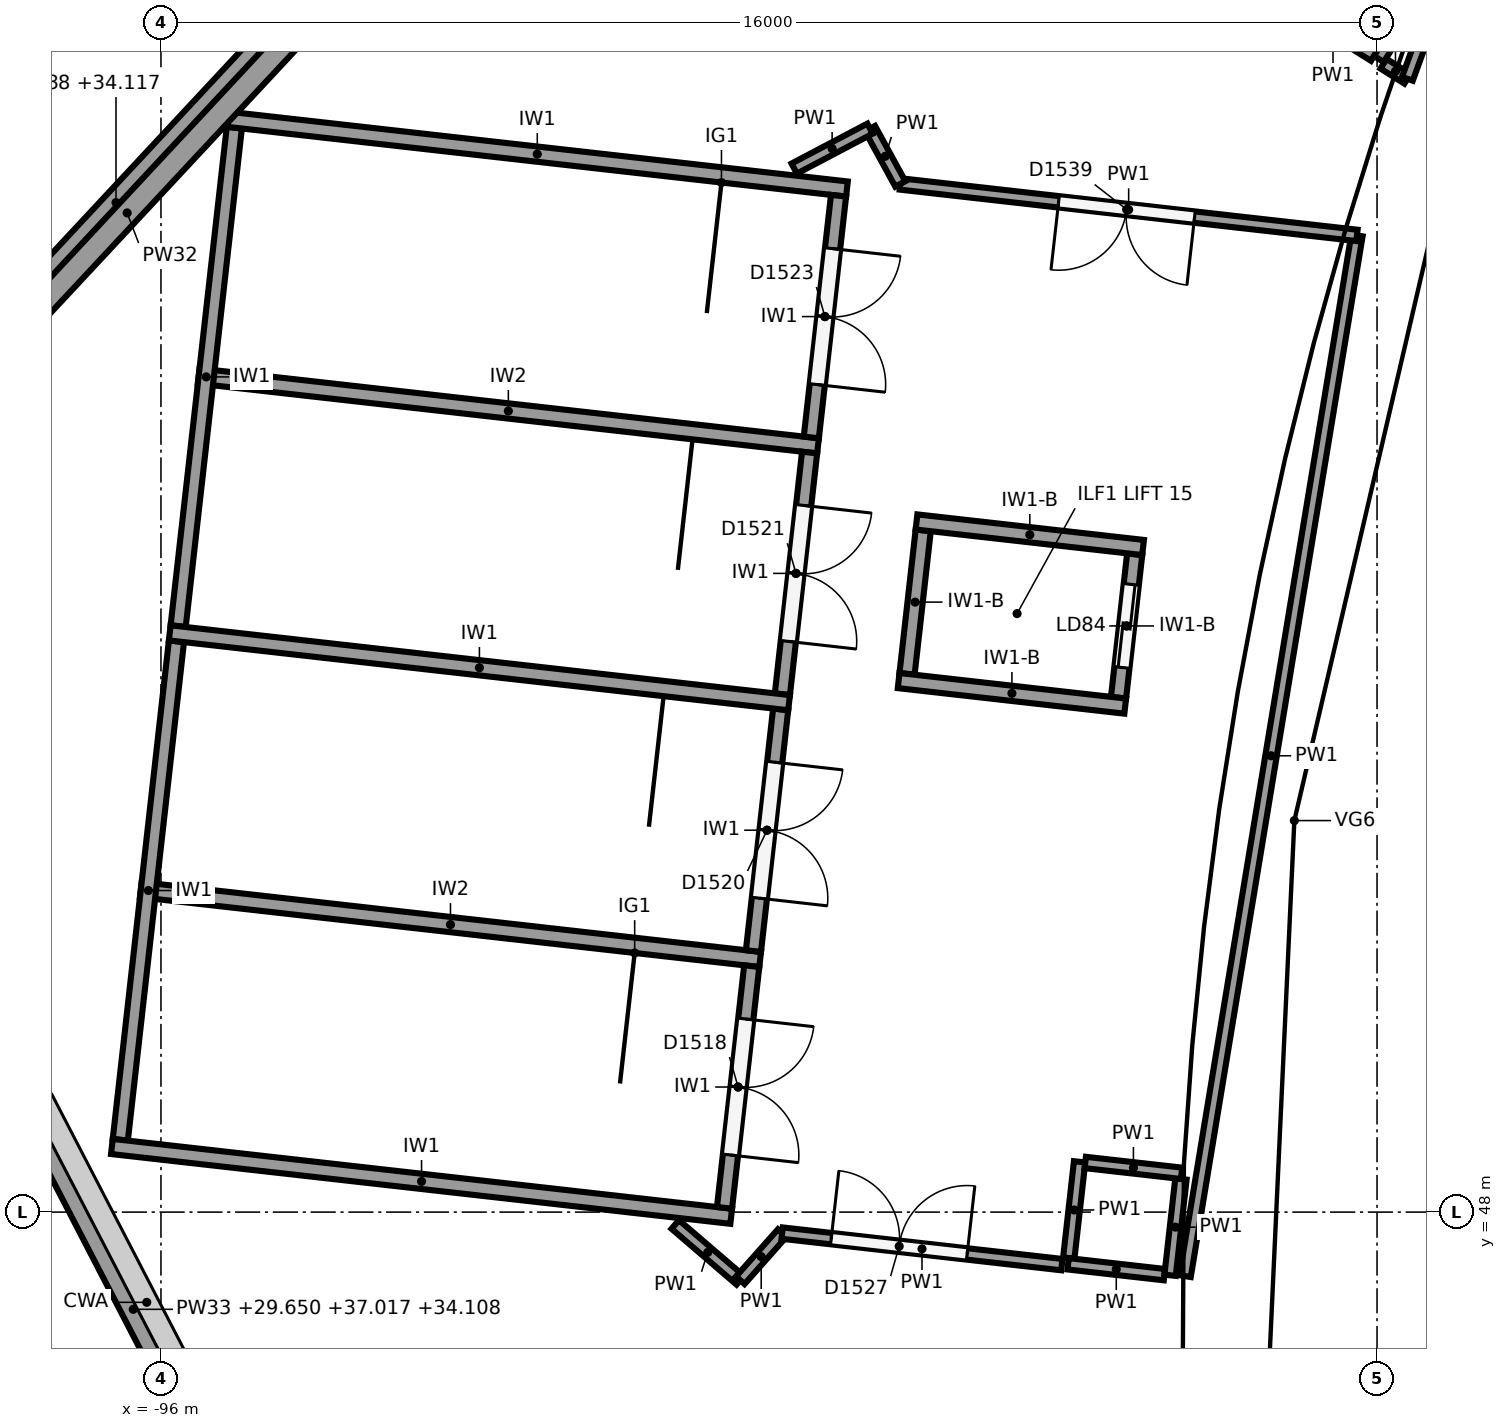
"""IFC4 building model, lengths in metres.
Left out: names, types, materials, properties, quantities, classifications, styles, units other than length and angle.
Written with IfcOpenShell. Run it as: python <this file> out.ifc"""

import sys

from ifc_helpers import new_model, si_unit, direction, frame, frame_2d, origin, origin_2d, place, context, subcontext, project, spatial, polyline, rectangle, circle, outline, extrude, element, fill, save


model = new_model("IFC4")
c1 = context("Model", 3, precision=1e-05, world=origin(), true_north=direction((0.0, 1.0)))
c2 = subcontext(c1, "Body", "Model", "MODEL_VIEW")
j1 = project(units=[si_unit("LENGTHUNIT", "METRE"), si_unit("PLANEANGLEUNIT", "RADIAN")], contexts=[c1])
p1 = place(None, origin())
s1 = spatial("IfcSite", under=j1, at=p1, CompositionType="ELEMENT")
p2 = place(p1, origin())
s2 = spatial("IfcBuilding", under=s1, at=p2, CompositionType="ELEMENT")
p3 = place(p2, frame((0.0, 0.0, 24.0)))
s3 = spatial("IfcBuildingStorey", under=s2, at=p3, CompositionType="ELEMENT", Elevation=24.0)
p4 = place(p3, frame((-82.169, 63.034, 0.0), z_axis=(0.0, 0.0, 1.0), x_axis=(1.0, 0.0, 0.0)))
e1 = element("IfcColumn", 1, at=p4, inside=s3, PredefinedType="COLUMN", context=c2, shape_type="SweptSolid", body=[
    extrude(circle(Radius=0.5, at=origin_2d()), origin(), (0.0, 0.0, 1.0), 6.0),
])
p5 = place(p3, frame((-84.363, 53.565, 0.0), z_axis=(0.0, 0.0, 1.0), x_axis=(1.0, 0.0, 0.0)))
e2 = element("IfcColumn", 2, at=p5, inside=s3, PredefinedType="COLUMN", context=c2, shape_type="SweptSolid", body=[
    extrude(circle(Radius=0.6, at=origin_2d()), origin(), (0.0, 0.0, 1.0), 6.0),
])
p6 = place(p3, frame((-100.711, 56.568, 0.0), z_axis=(0.0, 0.0, 1.0), x_axis=(0.681794658463, 0.731543603411, 0.0)))
e3 = element("IfcWall", 3, at=p6, inside=s3, PredefinedType="SOLIDWALL", context=c2, shape_type="SweptSolid", body=[
    extrude(rectangle(XDim=12.514, YDim=0.32, at=frame_2d((6.257, 0.0))), origin(), (0.0, 0.0, 1.0), 6.0),
])
p7 = place(p6, frame((10.864, 0.0, 1.0)))
e4 = element("IfcOpeningElement", 4, at=p7, cuts=e3, PredefinedType="OPENING", context=c2, shape_type="SweptSolid", body=[
    extrude(rectangle(XDim=0.9, YDim=3.25, at=frame_2d((0.45, 1.625))), frame((0.0, 0.17, 0.0), z_axis=(0.0, -1.0, 0.0), x_axis=(1.0, 0.0, 0.0)), (0.0, 0.0, 1.0), 0.34),
])
p8 = place(p6, frame((0.364, 0.0, 1.0)))
e5 = element("IfcOpeningElement", 5, at=p8, cuts=e3, PredefinedType="OPENING", context=c2, shape_type="SweptSolid", body=[
    extrude(rectangle(XDim=0.9, YDim=3.25, at=frame_2d((0.45, 1.625))), frame((0.0, 0.17, 0.0), z_axis=(0.0, -1.0, 0.0), x_axis=(1.0, 0.0, 0.0)), (0.0, 0.0, 1.0), 0.34),
])
p9 = place(p3, frame((-100.857, 56.705, 6.0), z_axis=(0.0, 0.0, 1.0), x_axis=(0.681794658463, 0.731543603411, 0.0)))
e6 = element("IfcWall", 6, at=p9, inside=s3, PredefinedType="SOLIDWALL", context=c2, shape_type="SweptSolid", body=[
    extrude(outline(polyline([(0.0, 0.0), (12.514, 0.0), (12.514, 4.117), (0.0, 10.438), (0.0, 0.0)])), frame((0.0, 0.16, 0.0), z_axis=(0.0, -1.0, 0.0), x_axis=(1.0, 0.0, 0.0)), (0.0, 0.0, 1.0), 0.32),
])
p10 = place(p9, frame((0.364, 0.0, 1.6)))
e7 = element("IfcOpeningElement", 7, at=p10, cuts=e6, PredefinedType="OPENING", context=c2, shape_type="SweptSolid", body=[
    extrude(rectangle(XDim=0.9, YDim=3.0, at=frame_2d((0.45, 1.5))), frame((0.0, 0.17, 0.0), z_axis=(0.0, -1.0, 0.0), x_axis=(1.0, 0.0, 0.0)), (0.0, 0.0, 1.0), 0.34),
])
p11 = place(p3, frame((-94.984, 44.057, 5.65), z_axis=(0.0, 0.0, 1.0), x_axis=(-0.460041593728, 0.887897365713, 0.0)))
e8 = element("IfcWall", 8, at=p11, inside=s3, PredefinedType="SOLIDWALL", context=c2, shape_type="SweptSolid", body=[
    extrude(outline(polyline([(0.0, 0.0), (6.0, 0.0), (6.0, 7.367), (0.0, 4.458), (0.0, 0.0)])), frame((0.0, 0.16, 0.0), z_axis=(0.0, -1.0, 0.0), x_axis=(1.0, 0.0, 0.0)), (0.0, 0.0, 1.0), 0.32),
])
p12 = place(p3, frame((-95.123, 62.378, 0.0), z_axis=(0.0, 0.0, 1.0), x_axis=(0.993710792168, -0.111977058046, 0.0)))
e9 = element("IfcWall", 9, at=p12, inside=s3, PredefinedType="SHEAR", context=c2, shape_type="SweptSolid", body=[
    extrude(rectangle(XDim=8.2, YDim=0.2, at=frame_2d((4.1, 0.0))), origin(), (0.0, 0.0, 1.0), 5.75),
])
p13 = place(p3, frame((-95.885, 55.621, 0.0), z_axis=(0.0, 0.0, 1.0), x_axis=(0.993711165474, -0.111973745194, 0.0)))
e10 = element("IfcWall", 10, at=p13, inside=s3, PredefinedType="SHEAR", context=c2, shape_type="SweptSolid", body=[
    extrude(rectangle(XDim=8.2, YDim=0.2, at=frame_2d((4.1, 0.0))), origin(), (0.0, 0.0, 1.0), 5.75),
])
p14 = place(p3, frame((-96.646, 48.863, 0.0), z_axis=(0.0, 0.0, 1.0), x_axis=(0.993714104693, -0.111947658007, 0.0)))
e11 = element("IfcWall", 11, at=p14, inside=s3, PredefinedType="SHEAR", context=c2, shape_type="SweptSolid", body=[
    extrude(rectangle(XDim=8.2, YDim=0.2, at=frame_2d((4.1, 0.0))), origin(), (0.0, 0.0, 1.0), 5.75),
])
for number, where, z_axis, x_axis in (
    (12, (-95.035, 62.267, 0.0), (0.0, 0.0, 1.0), (-0.112, -0.994, 0.0)),
    (13, (-95.796, 55.51, 0.0), (0.0, 0.0, 1.0), (-0.112, -0.994, 0.0)),
):
    element("IfcWall", number, at=place(p3, frame(where, z_axis=z_axis, x_axis=x_axis)), inside=s3, PredefinedType="SHEAR", context=c2, shape_type="SweptSolid", body=[
        extrude(rectangle(XDim=6.6, YDim=0.2, at=frame_2d((3.3, 0.0))), origin(), (0.0, 0.0, 1.0), 5.75),
    ])
p15 = place(p3, frame((-95.504, 58.999, 0.0), z_axis=(0.0, 0.0, 1.0), x_axis=(0.993710792168, -0.111977058046, 0.0)))
e14 = element("IfcWall", 14, at=p15, inside=s3, PredefinedType="SHEAR", context=c2, shape_type="SweptSolid", body=[
    extrude(rectangle(XDim=8.2, YDim=0.2, at=frame_2d((4.1, 0.0))), origin(), (0.0, 0.0, 1.0), 5.75),
])
p16 = place(p3, frame((-96.265, 52.242, 0.0), z_axis=(0.0, 0.0, 1.0), x_axis=(0.993713731549, -0.111950970206, 0.0)))
e15 = element("IfcWall", 15, at=p16, inside=s3, PredefinedType="SHEAR", context=c2, shape_type="SweptSolid", body=[
    extrude(rectangle(XDim=8.2, YDim=0.2, at=frame_2d((4.1, 0.0))), origin(), (0.0, 0.0, 1.0), 5.75),
])
p17 = place(p3, frame((-87.085, 61.372, 0.0), z_axis=(0.0, 0.0, 1.0), x_axis=(-0.11192190762, -0.993717005286, 0.0)))
e16 = element("IfcWall", 16, at=p17, inside=s3, PredefinedType="SHEAR", context=c2, shape_type="SweptSolid", body=[
    extrude(rectangle(XDim=3.2, YDim=0.2, at=frame_2d((1.6, 0.0))), origin(), (0.0, 0.0, 1.0), 5.75),
])
p18 = place(p17, frame((0.7, 0.0, 0.0)))
e17 = element("IfcOpeningElement", 17, at=p18, cuts=e16, PredefinedType="OPENING", context=c2, shape_type="SweptSolid", body=[
    extrude(rectangle(XDim=1.8, YDim=2.1, at=frame_2d((0.9, 1.05))), frame((0.0, 0.11, 0.0), z_axis=(0.0, -1.0, 0.0), x_axis=(1.0, 0.0, 0.0)), (0.0, 0.0, 1.0), 0.22),
])
p19 = place(p3, frame((-87.466, 57.993, 0.0), z_axis=(0.0, 0.0, 1.0), x_axis=(-0.111997244021, -0.993708517288, 0.0)))
e18 = element("IfcWall", 18, at=p19, inside=s3, PredefinedType="SHEAR", context=c2, shape_type="SweptSolid", body=[
    extrude(rectangle(XDim=3.2, YDim=0.2, at=frame_2d((1.6, 0.0))), origin(), (0.0, 0.0, 1.0), 5.75),
])
p20 = place(p19, frame((0.7, 0.0, 0.0)))
e19 = element("IfcOpeningElement", 19, at=p20, cuts=e18, PredefinedType="OPENING", context=c2, shape_type="SweptSolid", body=[
    extrude(rectangle(XDim=1.8, YDim=2.1, at=frame_2d((0.9, 1.05))), frame((0.0, 0.11, 0.0), z_axis=(0.0, -1.0, 0.0), x_axis=(1.0, 0.0, 0.0)), (0.0, 0.0, 1.0), 0.22),
])
p21 = place(p3, frame((-87.846, 54.614, 0.0), z_axis=(0.0, 0.0, 1.0), x_axis=(-0.112005735442, -0.993707560215, 0.0)))
e20 = element("IfcWall", 20, at=p21, inside=s3, PredefinedType="SHEAR", context=c2, shape_type="SweptSolid", body=[
    extrude(rectangle(XDim=3.2, YDim=0.2, at=frame_2d((1.6, 0.0))), origin(), (0.0, 0.0, 1.0), 5.75),
])
p22 = place(p21, frame((0.7, 0.0, 0.0)))
e21 = element("IfcOpeningElement", 21, at=p22, cuts=e20, PredefinedType="OPENING", context=c2, shape_type="SweptSolid", body=[
    extrude(rectangle(XDim=1.8, YDim=2.1, at=frame_2d((0.9, 1.05))), frame((0.0, 0.11, 0.0), z_axis=(0.0, -1.0, 0.0), x_axis=(1.0, 0.0, 0.0)), (0.0, 0.0, 1.0), 0.22),
])
p23 = place(p3, frame((-88.227, 51.236, 0.0), z_axis=(0.0, 0.0, 1.0), x_axis=(-0.111930393474, -0.993716049491, 0.0)))
e22 = element("IfcWall", 22, at=p23, inside=s3, PredefinedType="SHEAR", context=c2, shape_type="SweptSolid", body=[
    extrude(rectangle(XDim=3.2, YDim=0.2, at=frame_2d((1.6, 0.0))), origin(), (0.0, 0.0, 1.0), 5.75),
])
p24 = place(p23, frame((0.7, 0.0, 0.0)))
e23 = element("IfcOpeningElement", 23, at=p24, cuts=e22, PredefinedType="OPENING", context=c2, shape_type="SweptSolid", body=[
    extrude(rectangle(XDim=1.8, YDim=2.1, at=frame_2d((0.9, 1.05))), frame((0.0, 0.11, 0.0), z_axis=(0.0, -1.0, 0.0), x_axis=(1.0, 0.0, 0.0)), (0.0, 0.0, 1.0), 0.22),
])
for number, where, z_axis, x_axis in (
    (24, (-86.059, 57.08, 0.0), (0.0, 0.0, 1.0), (0.994, -0.112, 0.0)),
    (25, (-86.294, 54.993, 0.0), (0.0, 0.0, 1.0), (0.994, -0.112, 0.0)),
):
    element("IfcWall", number, at=place(p3, frame(where, z_axis=z_axis, x_axis=x_axis)), inside=s3, PredefinedType="SHEAR", context=c2, shape_type="SweptSolid", body=[
        extrude(rectangle(XDim=3.0, YDim=0.2, at=frame_2d((1.5, 0.0))), origin(), (0.0, 0.0, 1.0), 4.6),
    ])
p25 = place(p3, frame((-85.971, 56.969, 0.0), z_axis=(0.0, 0.0, 1.0), x_axis=(-0.112039012324, -0.993703808847, 0.0)))
e26 = element("IfcWall", 26, at=p25, inside=s3, PredefinedType="SHEAR", context=c2, shape_type="SweptSolid", body=[
    extrude(rectangle(XDim=1.9, YDim=0.2, at=frame_2d((0.95, 0.0))), origin(), (0.0, 0.0, 1.0), 4.6),
])
p26 = place(p3, frame((-83.189, 56.656, 0.0), z_axis=(0.0, 0.0, 1.0), x_axis=(-0.11191213732, -0.993718105662, 0.0)))
e27 = element("IfcWall", 27, at=p26, inside=s3, PredefinedType="SHEAR", context=c2, shape_type="SweptSolid", body=[
    extrude(rectangle(XDim=1.9, YDim=0.2, at=frame_2d((0.95, 0.0))), origin(), (0.0, 0.0, 1.0), 4.6),
])
p27 = place(p26, frame((0.4, 0.0, 0.0)))
e28 = element("IfcOpeningElement", 28, at=p27, cuts=e27, PredefinedType="OPENING", context=c2, shape_type="SweptSolid", body=[
    extrude(rectangle(XDim=1.1, YDim=2.1, at=frame_2d((0.55, 1.05))), frame((0.0, 0.11, 0.0), z_axis=(0.0, -1.0, 0.0), x_axis=(1.0, 0.0, 0.0)), (0.0, 0.0, 1.0), 0.22),
])
p28 = place(p3, frame((-81.119, 63.888, 0.0), z_axis=(0.0, 0.0, 1.0), x_axis=(0.846683377265, -0.532097038765, 0.0)))
e29 = element("IfcWall", 29, at=p28, inside=s3, PredefinedType="PARTITIONING", context=c2, shape_type="SweptSolid", body=[
    extrude(rectangle(XDim=1.275, YDim=0.15, at=frame_2d((0.638, 0.0))), origin(), (0.0, 0.0, 1.0), 5.4),
])
p29 = place(p3, frame((-79.976, 63.17, 0.0), z_axis=(0.0, 0.0, 1.0), x_axis=(0.531959757672, 0.846769635862, 0.0)))
e30 = element("IfcWall", 30, at=p29, inside=s3, PredefinedType="PARTITIONING", context=c2, shape_type="SweptSolid", body=[
    extrude(rectangle(XDim=1.275, YDim=0.15, at=frame_2d((0.637, 0.0))), origin(), (0.0, 0.0, 1.0), 5.4),
])
p30 = place(p3, frame((-79.915, 63.108, 0.0), z_axis=(0.0, 0.0, 1.0), x_axis=(0.846738245251, -0.532009721744, 0.0)))
e31 = element("IfcWall", 31, at=p30, inside=s3, PredefinedType="PARTITIONING", context=c2, shape_type="SweptSolid", body=[
    extrude(rectangle(XDim=0.371, YDim=0.15, at=frame_2d((0.186, 0.0))), origin(), (0.0, 0.0, 1.0), 5.4),
])
p31 = place(p3, frame((-79.601, 62.91, 0.0), z_axis=(0.0, 0.0, 1.0), x_axis=(0.341400782583, 0.939917818563, 0.0)))
e32 = element("IfcWall", 32, at=p31, inside=s3, PredefinedType="PARTITIONING", context=c2, shape_type="SweptSolid", body=[
    extrude(rectangle(XDim=1.26, YDim=0.15, at=frame_2d((0.63, 0.0))), origin(), (0.0, 0.0, 1.0), 5.4),
])
for number, where, z_axis, x_axis in (
    (33, (-83.913, 48.662, 0.0), (0.0, 0.0, 1.0), (-0.112, -0.994, 0.0)),
    (34, (-84.064, 47.32, 0.0), (0.0, 0.0, 1.0), (0.994, -0.112, 0.0)),
):
    element("IfcWall", number, at=place(p3, frame(where, z_axis=z_axis, x_axis=x_axis)), inside=s3, PredefinedType="PARTITIONING", context=c2, shape_type="SweptSolid", body=[
        extrude(rectangle(XDim=1.275, YDim=0.15, at=frame_2d((0.638, 0.0))), origin(), (0.0, 0.0, 1.0), 5.4),
    ])
for number, where, z_axis, x_axis in (
    (35, (-82.723, 47.169, 0.0), (0.0, 0.0, 1.0), (0.112, 0.994, 0.0)),
    (36, (-82.572, 48.51, 0.0), (0.0, 0.0, 1.0), (-0.994, 0.112, 0.0)),
):
    element("IfcWall", number, at=place(p3, frame(where, z_axis=z_axis, x_axis=x_axis)), inside=s3, PredefinedType="PARTITIONING", context=c2, shape_type="SweptSolid", body=[
        extrude(rectangle(XDim=1.275, YDim=0.15, at=frame_2d((0.637, 0.0))), origin(), (0.0, 0.0, 1.0), 5.4),
    ])
p32 = place(p3, frame((-89.234, 47.837, 0.0), z_axis=(0.0, 0.0, 1.0), x_axis=(0.758950911089, -0.651147843855, 0.0)))
e37 = element("IfcWall", 37, at=p32, inside=s3, PredefinedType="PARTITIONING", context=c2, shape_type="SweptSolid", body=[
    extrude(rectangle(XDim=1.128, YDim=0.15, at=frame_2d((0.564, 0.0))), origin(), (0.0, 0.0, 1.0), 5.4),
])
p33 = place(p3, frame((-88.378, 47.103, 0.0), z_axis=(0.0, 0.0, 1.0), x_axis=(0.66330376879, 0.748350259109, 0.0)))
e38 = element("IfcWall", 38, at=p33, inside=s3, PredefinedType="PARTITIONING", context=c2, shape_type="SweptSolid", body=[
    extrude(rectangle(XDim=0.83, YDim=0.15, at=frame_2d((0.415, 0.0))), origin(), (0.0, 0.0, 1.0), 5.4),
])
p34 = place(p3, frame((-87.827, 47.724, 0.0), z_axis=(0.0, 0.0, 1.0), x_axis=(0.993708869306, -0.11199412066, 0.0)))
e39 = element("IfcWall", 39, at=p34, inside=s3, PredefinedType="PARTITIONING", context=c2, shape_type="SweptSolid", body=[
    extrude(rectangle(XDim=3.704, YDim=0.15, at=frame_2d((1.852, 0.0))), origin(), (0.0, 0.0, 1.0), 5.4),
])
p35 = place(p34, frame((0.65, 0.0, 0.0)))
e40 = element("IfcOpeningElement", 40, at=p35, cuts=e39, PredefinedType="OPENING", context=c2, shape_type="SweptSolid", body=[
    extrude(rectangle(XDim=1.8, YDim=2.1, at=frame_2d((0.9, 1.05))), frame((0.0, 0.085, 0.0), z_axis=(0.0, -1.0, 0.0), x_axis=(1.0, 0.0, 0.0)), (0.0, 0.0, 1.0), 0.17),
])
p36 = place(p3, frame((-82.525, 47.158, 0.0), z_axis=(0.0, 0.0, 1.0), x_axis=(0.162926716645, 0.986638173295, 0.0)))
e41 = element("IfcWall", 41, at=p36, inside=s3, PredefinedType="PARTITIONING", context=c2, shape_type="SweptSolid", body=[
    extrude(rectangle(XDim=13.877, YDim=0.15, at=frame_2d((6.939, 0.0))), origin(), (0.0, 0.0, 1.0), 5.4),
])
p37 = place(p3, frame((-80.264, 60.85, 0.0), z_axis=(0.0, 0.0, 1.0), x_axis=(-0.993711169243, 0.111973711744, 0.0)))
e42 = element("IfcWall", 42, at=p37, inside=s3, PredefinedType="PARTITIONING", context=c2, shape_type="SweptSolid", body=[
    extrude(rectangle(XDim=6.046, YDim=0.15, at=frame_2d((3.023, 0.0))), origin(), (0.0, 0.0, 1.0), 5.4),
])
p38 = place(p37, frame((2.15, 0.0, 0.0)))
e43 = element("IfcOpeningElement", 43, at=p38, cuts=e42, PredefinedType="OPENING", context=c2, shape_type="SweptSolid", body=[
    extrude(rectangle(XDim=1.8, YDim=2.1, at=frame_2d((0.9, 1.05))), frame((0.0, 0.085, 0.0), z_axis=(0.0, -1.0, 0.0), x_axis=(1.0, 0.0, 0.0)), (0.0, 0.0, 1.0), 0.17),
])
p39 = place(p3, frame((-86.272, 61.527, 0.0), z_axis=(0.0, 0.0, 1.0), x_axis=(-0.480336186773, 0.877084458691, 0.0)))
e44 = element("IfcWall", 44, at=p39, inside=s3, PredefinedType="PARTITIONING", context=c2, shape_type="SweptSolid", body=[
    extrude(rectangle(XDim=0.83, YDim=0.15, at=frame_2d((0.415, 0.0))), origin(), (0.0, 0.0, 1.0), 5.4),
])
p40 = place(p3, frame((-86.67, 62.254, 0.0), z_axis=(0.0, 0.0, 1.0), x_axis=(-0.884880656279, -0.465817801446, 0.0)))
e45 = element("IfcWall", 45, at=p40, inside=s3, PredefinedType="PARTITIONING", context=c2, shape_type="SweptSolid", body=[
    extrude(rectangle(XDim=1.128, YDim=0.15, at=frame_2d((0.564, 0.0))), origin(), (0.0, 0.0, 1.0), 5.4),
])
p41 = place(p18, origin())
e46 = element("IfcDoor", 46, at=p41, inside=s3, OperationType="DOUBLE_DOOR_SINGLE_SWING", PredefinedType="DOOR", context=c2, shape_type="SweptSolid", body=[
    extrude(rectangle(XDim=1.8, YDim=2.1, at=frame_2d((0.9, 1.05))), frame((0.0, 0.025, 0.0), z_axis=(0.0, -1.0, 0.0), x_axis=(1.0, 0.0, 0.0)), (0.0, 0.0, 1.0), 0.05),
])
fill(e17, e46)
p42 = place(p20, origin())
e47 = element("IfcDoor", 47, at=p42, inside=s3, OperationType="DOUBLE_DOOR_SINGLE_SWING", PredefinedType="DOOR", context=c2, shape_type="SweptSolid", body=[
    extrude(rectangle(XDim=1.8, YDim=2.1, at=frame_2d((0.9, 1.05))), frame((0.0, 0.025, 0.0), z_axis=(0.0, -1.0, 0.0), x_axis=(1.0, 0.0, 0.0)), (0.0, 0.0, 1.0), 0.05),
])
fill(e19, e47)
p43 = place(p22, origin())
e48 = element("IfcDoor", 48, at=p43, inside=s3, OperationType="DOUBLE_DOOR_SINGLE_SWING", PredefinedType="DOOR", context=c2, shape_type="SweptSolid", body=[
    extrude(rectangle(XDim=1.8, YDim=2.1, at=frame_2d((0.9, 1.05))), frame((0.0, 0.025, 0.0), z_axis=(0.0, -1.0, 0.0), x_axis=(1.0, 0.0, 0.0)), (0.0, 0.0, 1.0), 0.05),
])
fill(e21, e48)
p44 = place(p24, origin())
e49 = element("IfcDoor", 49, at=p44, inside=s3, OperationType="DOUBLE_DOOR_SINGLE_SWING", PredefinedType="DOOR", context=c2, shape_type="SweptSolid", body=[
    extrude(rectangle(XDim=1.8, YDim=2.1, at=frame_2d((0.9, 1.05))), frame((0.0, 0.025, 0.0), z_axis=(0.0, -1.0, 0.0), x_axis=(1.0, 0.0, 0.0)), (0.0, 0.0, 1.0), 0.05),
])
fill(e23, e49)
p45 = place(p27, origin())
e50 = element("IfcDoor", 50, at=p45, inside=s3, OperationType="SLIDING_TO_RIGHT", PredefinedType="DOOR", context=c2, shape_type="SweptSolid", body=[
    extrude(rectangle(XDim=1.1, YDim=2.1, at=frame_2d((0.55, 1.05))), frame((0.0, 0.025, 0.0), z_axis=(0.0, -1.0, 0.0), x_axis=(1.0, 0.0, 0.0)), (0.0, 0.0, 1.0), 0.05),
])
fill(e28, e50)
p46 = place(p38, origin())
e51 = element("IfcDoor", 51, at=p46, inside=s3, OperationType="DOUBLE_DOOR_SINGLE_SWING", PredefinedType="DOOR", context=c2, shape_type="SweptSolid", body=[
    extrude(rectangle(XDim=1.8, YDim=2.1, at=frame_2d((0.9, 1.05))), frame((0.0, 0.025, 0.0), z_axis=(0.0, -1.0, 0.0), x_axis=(1.0, 0.0, 0.0)), (0.0, 0.0, 1.0), 0.05),
])
fill(e43, e51)
p47 = place(p35, origin())
e52 = element("IfcDoor", 52, at=p47, inside=s3, OperationType="DOUBLE_DOOR_SINGLE_SWING", PredefinedType="DOOR", context=c2, shape_type="SweptSolid", body=[
    extrude(rectangle(XDim=1.8, YDim=2.1, at=frame_2d((0.9, 1.05))), frame((0.0, 0.025, 0.0), z_axis=(0.0, -1.0, 0.0), x_axis=(1.0, 0.0, 0.0)), (0.0, 0.0, 1.0), 0.05),
])
fill(e40, e52)
save(model, sys.argv[1])
